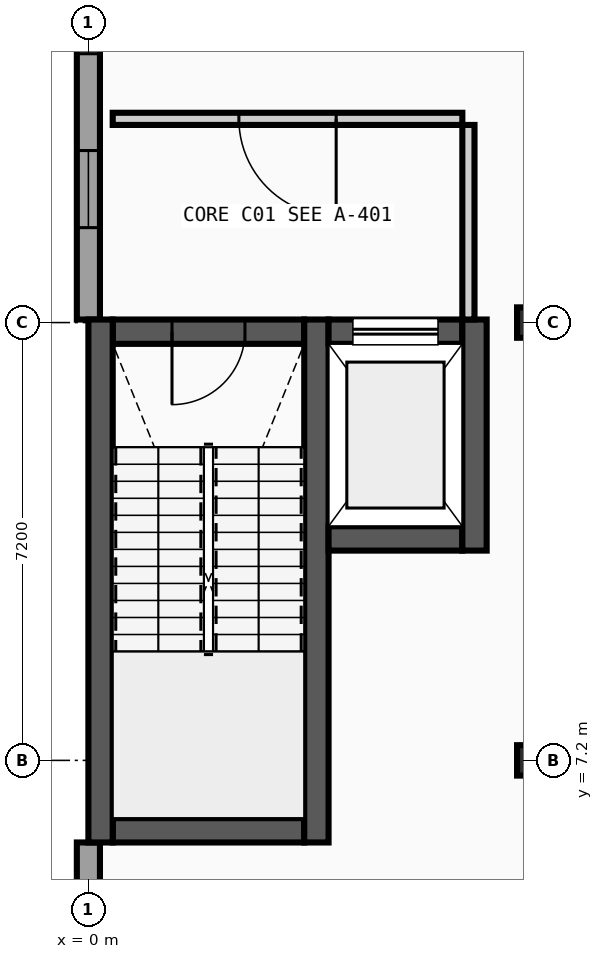
"""IFC4 building model, lengths in metres.
Left out: names, types, materials, properties, quantities, classifications, styles, units other than length and angle.
Written with IfcOpenShell. Run it as: python <this file> out.ifc"""

import sys

from ifc_helpers import new_model, si_unit, direction, frame, frame_2d, origin, origin_2d, place, context, subcontext, project, spatial, rectangle, i_section, extrude, element, fill, save


model = new_model("IFC4")
c1 = context("Model", 3, precision=1e-05, world=origin(), true_north=direction((0.0, 1.0)))
c2 = subcontext(c1, "Body", "Model", "MODEL_VIEW")
j1 = project(units=[si_unit("LENGTHUNIT", "METRE"), si_unit("PLANEANGLEUNIT", "RADIAN")], contexts=[c1])
p1 = place(None, origin())
s1 = spatial("IfcSite", under=j1, at=p1, CompositionType="ELEMENT")
p2 = place(p1, origin())
s2 = spatial("IfcBuilding", under=s1, at=p2, CompositionType="ELEMENT")
p3 = place(p2, frame((0.0, 0.0, 5.2)))
s3 = spatial("IfcBuildingStorey", under=s2, at=p3, CompositionType="ELEMENT", Elevation=5.2)
for number, where, z_axis, x_axis in (
    (1, (7.2, 7.2, 0.0), (0.0, 0.0, 1.0), (1.0, 0.0, 0.0)),
    (2, (7.2, 14.4, 0.0), (0.0, 0.0, 1.0), (1.0, 0.0, 0.0)),
):
    element("IfcColumn", number, at=place(p3, frame(where, z_axis=z_axis, x_axis=x_axis)), inside=s3, PredefinedType="COLUMN", context=c2, shape_type="SweptSolid", body=[
        extrude(i_section(OverallWidth=0.3, OverallDepth=0.5, WebThickness=0.014, FlangeThickness=0.028, FilletRadius=0.027, at=origin_2d()), origin(), (0.0, 0.0, 1.0), 4.4),
    ])
p4 = place(p3, frame((0.0, 5.85, 0.0), z_axis=(0.0, 0.0, 1.0), x_axis=(0.0, -1.0, 0.0)))
e3 = element("IfcWall", 3, at=p4, inside=s3, PredefinedType="STANDARD", context=c2, shape_type="SweptSolid", body=[
    extrude(rectangle(XDim=5.66, YDim=0.38, at=frame_2d((2.83, 0.0))), origin(), (0.0, 0.0, 1.0), 4.185),
])
p5 = place(p4, frame((2.213, 0.0, 0.95)))
e4 = element("IfcOpeningElement", 4, at=p5, cuts=e3, PredefinedType="OPENING", context=c2, shape_type="SweptSolid", body=[
    extrude(rectangle(XDim=1.234, YDim=1.26, at=frame_2d((0.617, 0.63))), frame((0.0, 0.2, 0.0), z_axis=(0.0, -1.0, 0.0), x_axis=(1.0, 0.0, 0.0)), (0.0, 0.0, 1.0), 0.4),
])
p6 = place(p3, frame((0.0, 21.6, 0.0), z_axis=(0.0, 0.0, 1.0), x_axis=(0.0, -1.0, 0.0)))
e5 = element("IfcWall", 5, at=p6, inside=s3, PredefinedType="STANDARD", context=c2, shape_type="SweptSolid", body=[
    extrude(rectangle(XDim=7.15, YDim=0.38, at=frame_2d((3.575, 0.0))), origin(), (0.0, 0.0, 1.0), 4.185),
])
p7 = place(p6, frame((1.511, 0.0, 0.95)))
e6 = element("IfcOpeningElement", 6, at=p7, cuts=e5, PredefinedType="OPENING", context=c2, shape_type="SweptSolid", body=[
    extrude(rectangle(XDim=1.268, YDim=1.26, at=frame_2d((0.634, 0.63))), frame((0.0, 0.2, 0.0), z_axis=(0.0, -1.0, 0.0), x_axis=(1.0, 0.0, 0.0)), (0.0, 0.0, 1.0), 0.4),
])
p8 = place(p6, frame((4.371, 0.0, 0.95)))
e7 = element("IfcOpeningElement", 7, at=p8, cuts=e5, PredefinedType="OPENING", context=c2, shape_type="SweptSolid", body=[
    extrude(rectangle(XDim=1.268, YDim=1.26, at=frame_2d((0.634, 0.63))), frame((0.0, 0.2, 0.0), z_axis=(0.0, -1.0, 0.0), x_axis=(1.0, 0.0, 0.0)), (0.0, 0.0, 1.0), 0.4),
])
p9 = place(p3, frame((0.4, 6.05, 0.0), z_axis=(0.0, 0.0, 1.0), x_axis=(1.0, 0.0, 0.0)))
e8 = element("IfcWall", 8, at=p9, inside=s3, PredefinedType="SHEAR", context=c2, shape_type="SweptSolid", body=[
    extrude(rectangle(XDim=3.15, YDim=0.4, at=frame_2d((1.575, 0.0))), origin(), (0.0, 0.0, 1.0), 4.185),
])
p10 = place(p3, frame((0.4, 14.25, 0.0), z_axis=(0.0, 0.0, 1.0), x_axis=(1.0, 0.0, 0.0)))
e9 = element("IfcWall", 9, at=p10, inside=s3, PredefinedType="SHEAR", context=c2, shape_type="SweptSolid", body=[
    extrude(rectangle(XDim=3.15, YDim=0.4, at=frame_2d((1.575, 0.0))), origin(), (0.0, 0.0, 1.0), 4.185),
])
p11 = place(p10, frame((0.975, 0.0, 0.0)))
e10 = element("IfcOpeningElement", 10, at=p11, cuts=e9, PredefinedType="OPENING", context=c2, shape_type="SweptSolid", body=[
    extrude(rectangle(XDim=1.2, YDim=2.15, at=frame_2d((0.6, 1.075))), frame((0.0, 0.21, 0.0), z_axis=(0.0, -1.0, 0.0), x_axis=(1.0, 0.0, 0.0)), (0.0, 0.0, 1.0), 0.42),
])
for number, where, z_axis, x_axis in (
    (11, (0.2, 5.85, 0.0), (0.0, 0.0, 1.0), (0.0, 1.0, 0.0)),
    (12, (3.75, 5.85, 0.0), (0.0, 0.0, 1.0), (0.0, 1.0, 0.0)),
):
    element("IfcWall", number, at=place(p3, frame(where, z_axis=z_axis, x_axis=x_axis)), inside=s3, PredefinedType="SHEAR", context=c2, shape_type="SweptSolid", body=[
        extrude(rectangle(XDim=8.6, YDim=0.4, at=frame_2d((4.3, 0.0))), origin(), (0.0, 0.0, 1.0), 4.185),
    ])
p12 = place(p3, frame((3.95, 10.85, 0.0), z_axis=(0.0, 0.0, 1.0), x_axis=(1.0, 0.0, 0.0)))
e13 = element("IfcWall", 13, at=p12, inside=s3, PredefinedType="SHEAR", context=c2, shape_type="SweptSolid", body=[
    extrude(rectangle(XDim=2.2, YDim=0.4, at=frame_2d((1.1, 0.0))), origin(), (0.0, 0.0, 1.0), 4.185),
])
p13 = place(p3, frame((3.95, 14.25, 0.0), z_axis=(0.0, 0.0, 1.0), x_axis=(1.0, 0.0, 0.0)))
e14 = element("IfcWall", 14, at=p13, inside=s3, PredefinedType="SHEAR", context=c2, shape_type="SweptSolid", body=[
    extrude(rectangle(XDim=2.2, YDim=0.4, at=frame_2d((1.1, 0.0))), origin(), (0.0, 0.0, 1.0), 4.185),
])
p14 = place(p13, frame((0.4, 0.0, 0.0)))
e15 = element("IfcOpeningElement", 15, at=p14, cuts=e14, PredefinedType="OPENING", context=c2, shape_type="SweptSolid", body=[
    extrude(rectangle(XDim=1.4, YDim=2.2, at=frame_2d((0.7, 1.1))), frame((0.0, 0.21, 0.0), z_axis=(0.0, -1.0, 0.0), x_axis=(1.0, 0.0, 0.0)), (0.0, 0.0, 1.0), 0.42),
])
p15 = place(p3, frame((6.35, 10.65, 0.0), z_axis=(0.0, 0.0, 1.0), x_axis=(0.0, 1.0, 0.0)))
e16 = element("IfcWall", 16, at=p15, inside=s3, PredefinedType="SHEAR", context=c2, shape_type="SweptSolid", body=[
    extrude(rectangle(XDim=3.8, YDim=0.4, at=frame_2d((1.9, 0.0))), origin(), (0.0, 0.0, 1.0), 4.185),
])
p16 = place(p3, frame((0.4, 17.75, 0.0), z_axis=(0.0, 0.0, 1.0), x_axis=(1.0, 0.0, 0.0)))
e17 = element("IfcWall", 17, at=p16, inside=s3, PredefinedType="PARTITIONING", context=c2, shape_type="SweptSolid", body=[
    extrude(rectangle(XDim=5.75, YDim=0.2, at=frame_2d((2.875, 0.0))), origin(), (0.0, 0.0, 1.0), 4.185),
])
p17 = place(p16, frame((2.075, 0.0, 0.0)))
e18 = element("IfcOpeningElement", 18, at=p17, cuts=e17, PredefinedType="OPENING", context=c2, shape_type="SweptSolid", body=[
    extrude(rectangle(XDim=1.6, YDim=2.2, at=frame_2d((0.8, 1.1))), frame((0.0, 0.11, 0.0), z_axis=(0.0, -1.0, 0.0), x_axis=(1.0, 0.0, 0.0)), (0.0, 0.0, 1.0), 0.22),
])
p18 = place(p3, frame((6.25, 14.45, 0.0), z_axis=(0.0, 0.0, 1.0), x_axis=(0.0, 1.0, 0.0)))
e19 = element("IfcWall", 19, at=p18, inside=s3, PredefinedType="PARTITIONING", context=c2, shape_type="SweptSolid", body=[
    extrude(rectangle(XDim=3.2, YDim=0.2, at=frame_2d((1.6, 0.0))), origin(), (0.0, 0.0, 1.0), 4.185),
])
p19 = place(p7, origin())
e20 = element("IfcWindow", 20, at=p19, inside=s3, PartitioningType="SINGLE_PANEL", PredefinedType="WINDOW", context=c2, shape_type="SweptSolid", body=[
    extrude(rectangle(XDim=1.268, YDim=1.26, at=frame_2d((0.634, 0.63))), frame((0.0, 0.03, 0.0), z_axis=(0.0, -1.0, 0.0), x_axis=(1.0, 0.0, 0.0)), (0.0, 0.0, 1.0), 0.06),
])
fill(e6, e20)
p20 = place(p8, origin())
e21 = element("IfcWindow", 21, at=p20, inside=s3, PartitioningType="SINGLE_PANEL", PredefinedType="WINDOW", context=c2, shape_type="SweptSolid", body=[
    extrude(rectangle(XDim=1.268, YDim=1.26, at=frame_2d((0.634, 0.63))), frame((0.0, 0.03, 0.0), z_axis=(0.0, -1.0, 0.0), x_axis=(1.0, 0.0, 0.0)), (0.0, 0.0, 1.0), 0.06),
])
fill(e7, e21)
p21 = place(p11, frame((1.2, 0.0, 0.0), z_axis=(0.0, 0.0, 1.0), x_axis=(-1.0, 0.0, 0.0)))
e22 = element("IfcDoor", 22, at=p21, inside=s3, OperationType="SINGLE_SWING_LEFT", PredefinedType="DOOR", context=c2, shape_type="SweptSolid", body=[
    extrude(rectangle(XDim=1.2, YDim=2.15, at=frame_2d((0.6, 1.075))), frame((0.0, 0.025, 0.0), z_axis=(0.0, -1.0, 0.0), x_axis=(1.0, 0.0, 0.0)), (0.0, 0.0, 1.0), 0.05),
])
fill(e10, e22)
p22 = place(p14, origin())
e23 = element("IfcDoor", 23, at=p22, inside=s3, OperationType="SLIDING_TO_LEFT", PredefinedType="DOOR", context=c2, shape_type="SweptSolid", body=[
    extrude(rectangle(XDim=1.4, YDim=2.2, at=frame_2d((0.7, 1.1))), frame((0.0, 0.025, 0.0), z_axis=(0.0, -1.0, 0.0), x_axis=(1.0, 0.0, 0.0)), (0.0, 0.0, 1.0), 0.05),
])
fill(e15, e23)
p23 = place(p17, origin())
e24 = element("IfcDoor", 24, at=p23, inside=s3, OperationType="DOUBLE_DOOR_SINGLE_SWING", PredefinedType="DOOR", context=c2, shape_type="SweptSolid", body=[
    extrude(rectangle(XDim=1.6, YDim=2.2, at=frame_2d((0.8, 1.1))), frame((0.0, 0.025, 0.0), z_axis=(0.0, -1.0, 0.0), x_axis=(1.0, 0.0, 0.0)), (0.0, 0.0, 1.0), 0.05),
])
fill(e18, e24)
save(model, sys.argv[1])
